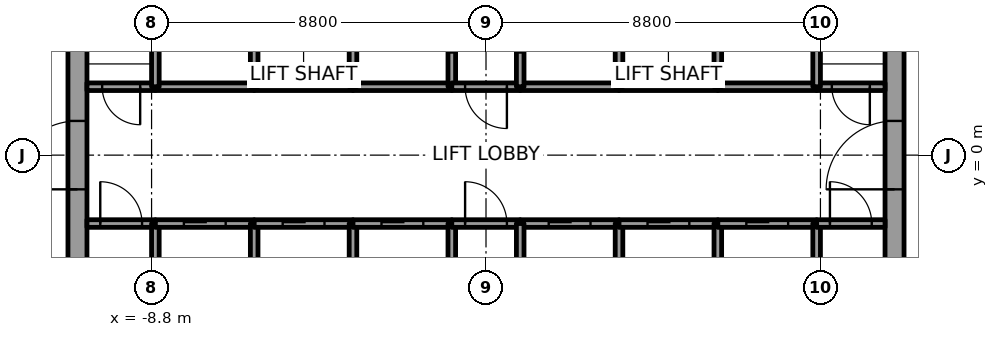
"""IFC4 building model, lengths in metres.
Left out: names, types, materials, properties, quantities, classifications, styles, units other than length and angle.
Written with IfcOpenShell. Run it as: python <this file> out.ifc"""

import sys

from ifc_helpers import new_model, si_unit, direction, frame, frame_2d, origin, place, context, subcontext, project, spatial, rectangle, extrude, element, fill, save


model = new_model("IFC4")
c1 = context("Model", 3, precision=1e-05, world=origin(), true_north=direction((0.0, 1.0)))
c2 = subcontext(c1, "Body", "Model", "MODEL_VIEW")
j1 = project(units=[si_unit("LENGTHUNIT", "METRE"), si_unit("PLANEANGLEUNIT", "RADIAN")], contexts=[c1])
p1 = place(None, origin())
s1 = spatial("IfcSite", under=j1, at=p1, CompositionType="ELEMENT")
p2 = place(p1, origin())
s2 = spatial("IfcBuilding", under=s1, at=p2, CompositionType="ELEMENT")
p3 = place(p2, frame((0.0, 0.0, 77.6)))
s3 = spatial("IfcBuildingStorey", under=s2, at=p3, CompositionType="ELEMENT", Elevation=77.6)
p4 = place(p3, frame((-10.75, -7.5, 0.0), z_axis=(0.0, 0.0, 1.0), x_axis=(0.0, 1.0, 0.0)))
e1 = element("IfcWall", 1, at=p4, inside=s3, PredefinedType="SHEAR", context=c2, shape_type="SweptSolid", body=[
    extrude(rectangle(XDim=15.0, YDim=0.5, at=frame_2d((7.5, 0.0))), origin(), (0.0, 0.0, 1.0), 3.7),
])
p5 = place(p4, frame((6.6, 0.0, 0.0)))
e2 = element("IfcOpeningElement", 2, at=p5, cuts=e1, PredefinedType="OPENING", context=c2, shape_type="SweptSolid", body=[
    extrude(rectangle(XDim=1.8, YDim=2.1, at=frame_2d((0.9, 1.05))), frame((0.0, 0.25, 0.0), z_axis=(0.0, -1.0, 0.0), x_axis=(1.0, 0.0, 0.0)), (0.0, 0.0, 1.0), 0.5),
])
p6 = place(p3, frame((10.75, -7.5, 0.0), z_axis=(0.0, 0.0, 1.0), x_axis=(0.0, 1.0, 0.0)))
e3 = element("IfcWall", 3, at=p6, inside=s3, PredefinedType="SHEAR", context=c2, shape_type="SweptSolid", body=[
    extrude(rectangle(XDim=15.0, YDim=0.5, at=frame_2d((7.5, 0.0))), origin(), (0.0, 0.0, 1.0), 3.7),
])
p7 = place(p6, frame((6.6, 0.0, 0.0)))
e4 = element("IfcOpeningElement", 4, at=p7, cuts=e3, PredefinedType="OPENING", context=c2, shape_type="SweptSolid", body=[
    extrude(rectangle(XDim=1.8, YDim=2.1, at=frame_2d((0.9, 1.05))), frame((0.0, 0.25, 0.0), z_axis=(0.0, -1.0, 0.0), x_axis=(1.0, 0.0, 0.0)), (0.0, 0.0, 1.0), 0.5),
])
p8 = place(p3, frame((-10.5, -1.8, 0.0), z_axis=(0.0, 0.0, 1.0), x_axis=(1.0, 0.0, 0.0)))
e5 = element("IfcWall", 5, at=p8, inside=s3, PredefinedType="SOLIDWALL", context=c2, shape_type="SweptSolid", body=[
    extrude(rectangle(XDim=1.8, YDim=0.2, at=frame_2d((0.9, 0.0))), origin(), (0.0, 0.0, 1.0), 3.55),
])
p9 = place(p8, frame((0.35, 0.0, 0.0)))
e6 = element("IfcOpeningElement", 6, at=p9, cuts=e5, PredefinedType="OPENING", context=c2, shape_type="SweptSolid", body=[
    extrude(rectangle(XDim=1.1, YDim=2.1, at=frame_2d((0.55, 1.05))), frame((0.0, 0.1, 0.0), z_axis=(0.0, -1.0, 0.0), x_axis=(1.0, 0.0, 0.0)), (0.0, 0.0, 1.0), 0.2),
])
p10 = place(p3, frame((-8.7, 1.8, 0.0), z_axis=(0.0, 0.0, 1.0), x_axis=(-1.0, 0.0, 0.0)))
e7 = element("IfcWall", 7, at=p10, inside=s3, PredefinedType="SOLIDWALL", context=c2, shape_type="SweptSolid", body=[
    extrude(rectangle(XDim=1.8, YDim=0.2, at=frame_2d((0.9, 0.0))), origin(), (0.0, 0.0, 1.0), 3.55),
])
p11 = place(p10, frame((0.4, 0.0, 0.0)))
e8 = element("IfcOpeningElement", 8, at=p11, cuts=e7, PredefinedType="OPENING", context=c2, shape_type="SweptSolid", body=[
    extrude(rectangle(XDim=1.0, YDim=2.1, at=frame_2d((0.5, 1.05))), frame((0.0, 0.1, 0.0), z_axis=(0.0, -1.0, 0.0), x_axis=(1.0, 0.0, 0.0)), (0.0, 0.0, 1.0), 0.2),
])
p12 = place(p3, frame((-8.7, -4.6, 0.0), z_axis=(0.0, 0.0, 1.0), x_axis=(0.0, 1.0, 0.0)))
e9 = element("IfcWall", 9, at=p12, inside=s3, PredefinedType="SOLIDWALL", context=c2, shape_type="SweptSolid", body=[
    extrude(rectangle(XDim=2.8, YDim=0.2, at=frame_2d((1.4, 0.0))), origin(), (0.0, 0.0, 1.0), 3.55),
])
p13 = place(p3, frame((-8.7, -1.8, 0.0), z_axis=(0.0, 0.0, 1.0), x_axis=(1.0, 0.0, 0.0)))
e10 = element("IfcWall", 10, at=p13, inside=s3, PredefinedType="SOLIDWALL", context=c2, shape_type="SweptSolid", body=[
    extrude(rectangle(XDim=2.6, YDim=0.2, at=frame_2d((1.3, 0.0))), origin(), (0.0, 0.0, 1.0), 3.55),
])
p14 = place(p13, frame((0.75, 0.0, 0.0)))
e11 = element("IfcOpeningElement", 11, at=p14, cuts=e10, PredefinedType="OPENING", context=c2, shape_type="SweptSolid", body=[
    extrude(rectangle(XDim=1.1, YDim=2.1, at=frame_2d((0.55, 1.05))), frame((0.0, 0.1, 0.0), z_axis=(0.0, -1.0, 0.0), x_axis=(1.0, 0.0, 0.0)), (0.0, 0.0, 1.0), 0.2),
])
p15 = place(p3, frame((-6.1, 1.8, 0.0), z_axis=(0.0, 0.0, 1.0), x_axis=(-1.0, 0.0, 0.0)))
e12 = element("IfcWall", 12, at=p15, inside=s3, PredefinedType="SOLIDWALL", context=c2, shape_type="SweptSolid", body=[
    extrude(rectangle(XDim=2.6, YDim=0.2, at=frame_2d((1.3, 0.0))), origin(), (0.0, 0.0, 1.0), 3.55),
])
for number, where, z_axis, x_axis in (
    (13, (-8.7, 1.8, 0.0), (0.0, 0.0, 1.0), (0.0, 1.0, 0.0)),
    (14, (-6.1, -4.6, 0.0), (0.0, 0.0, 1.0), (0.0, 1.0, 0.0)),
):
    element("IfcWall", number, at=place(p3, frame(where, z_axis=z_axis, x_axis=x_axis)), inside=s3, PredefinedType="SOLIDWALL", context=c2, shape_type="SweptSolid", body=[
        extrude(rectangle(XDim=2.8, YDim=0.2, at=frame_2d((1.4, 0.0))), origin(), (0.0, 0.0, 1.0), 3.55),
    ])
p16 = place(p3, frame((-6.1, -1.8, 0.0), z_axis=(0.0, 0.0, 1.0), x_axis=(1.0, 0.0, 0.0)))
e15 = element("IfcWall", 15, at=p16, inside=s3, PredefinedType="SOLIDWALL", context=c2, shape_type="SweptSolid", body=[
    extrude(rectangle(XDim=2.6, YDim=0.2, at=frame_2d((1.3, 0.0))), origin(), (0.0, 0.0, 1.0), 3.55),
])
p17 = place(p16, frame((0.75, 0.0, 0.0)))
e16 = element("IfcOpeningElement", 16, at=p17, cuts=e15, PredefinedType="OPENING", context=c2, shape_type="SweptSolid", body=[
    extrude(rectangle(XDim=1.1, YDim=2.1, at=frame_2d((0.55, 1.05))), frame((0.0, 0.1, 0.0), z_axis=(0.0, -1.0, 0.0), x_axis=(1.0, 0.0, 0.0)), (0.0, 0.0, 1.0), 0.2),
])
p18 = place(p3, frame((-3.5, 1.8, 0.0), z_axis=(0.0, 0.0, 1.0), x_axis=(-1.0, 0.0, 0.0)))
e17 = element("IfcWall", 17, at=p18, inside=s3, PredefinedType="SOLIDWALL", context=c2, shape_type="SweptSolid", body=[
    extrude(rectangle(XDim=2.6, YDim=0.2, at=frame_2d((1.3, 0.0))), origin(), (0.0, 0.0, 1.0), 3.55),
])
for number, where, z_axis, x_axis in (
    (18, (-6.1, 1.8, 0.0), (0.0, 0.0, 1.0), (0.0, 1.0, 0.0)),
    (19, (-3.5, -4.6, 0.0), (0.0, 0.0, 1.0), (0.0, 1.0, 0.0)),
):
    element("IfcWall", number, at=place(p3, frame(where, z_axis=z_axis, x_axis=x_axis)), inside=s3, PredefinedType="SOLIDWALL", context=c2, shape_type="SweptSolid", body=[
        extrude(rectangle(XDim=2.8, YDim=0.2, at=frame_2d((1.4, 0.0))), origin(), (0.0, 0.0, 1.0), 3.55),
    ])
p19 = place(p3, frame((-3.5, -1.8, 0.0), z_axis=(0.0, 0.0, 1.0), x_axis=(1.0, 0.0, 0.0)))
e20 = element("IfcWall", 20, at=p19, inside=s3, PredefinedType="SOLIDWALL", context=c2, shape_type="SweptSolid", body=[
    extrude(rectangle(XDim=2.6, YDim=0.2, at=frame_2d((1.3, 0.0))), origin(), (0.0, 0.0, 1.0), 3.55),
])
p20 = place(p19, frame((0.75, 0.0, 0.0)))
e21 = element("IfcOpeningElement", 21, at=p20, cuts=e20, PredefinedType="OPENING", context=c2, shape_type="SweptSolid", body=[
    extrude(rectangle(XDim=1.1, YDim=2.1, at=frame_2d((0.55, 1.05))), frame((0.0, 0.1, 0.0), z_axis=(0.0, -1.0, 0.0), x_axis=(1.0, 0.0, 0.0)), (0.0, 0.0, 1.0), 0.2),
])
p21 = place(p3, frame((-0.9, 1.8, 0.0), z_axis=(0.0, 0.0, 1.0), x_axis=(-1.0, 0.0, 0.0)))
e22 = element("IfcWall", 22, at=p21, inside=s3, PredefinedType="SOLIDWALL", context=c2, shape_type="SweptSolid", body=[
    extrude(rectangle(XDim=2.6, YDim=0.2, at=frame_2d((1.3, 0.0))), origin(), (0.0, 0.0, 1.0), 3.55),
])
p22 = place(p3, frame((-3.5, 4.6, 0.0), z_axis=(0.0, 0.0, 1.0), x_axis=(0.0, -1.0, 0.0)))
e23 = element("IfcWall", 23, at=p22, inside=s3, PredefinedType="SOLIDWALL", context=c2, shape_type="SweptSolid", body=[
    extrude(rectangle(XDim=2.8, YDim=0.2, at=frame_2d((1.4, 0.0))), origin(), (0.0, 0.0, 1.0), 3.55),
])
p23 = place(p3, frame((-0.9, 1.8, 0.0), z_axis=(0.0, 0.0, 1.0), x_axis=(0.0, 1.0, 0.0)))
e24 = element("IfcWall", 24, at=p23, inside=s3, PredefinedType="SOLIDWALL", context=c2, shape_type="SweptSolid", body=[
    extrude(rectangle(XDim=3.0, YDim=0.2, at=frame_2d((1.5, 0.0))), origin(), (0.0, 0.0, 1.0), 3.55),
])
p24 = place(p23, frame((0.9, 0.0, 0.0)))
e25 = element("IfcOpeningElement", 25, at=p24, cuts=e24, PredefinedType="OPENING", context=c2, shape_type="SweptSolid", body=[
    extrude(rectangle(XDim=1.2, YDim=2.1, at=frame_2d((0.6, 1.05))), frame((0.0, 0.1, 0.0), z_axis=(0.0, -1.0, 0.0), x_axis=(1.0, 0.0, 0.0)), (0.0, 0.0, 1.0), 0.2),
])
p25 = place(p3, frame((-0.9, -4.6, 0.0), z_axis=(0.0, 0.0, 1.0), x_axis=(0.0, 1.0, 0.0)))
e26 = element("IfcWall", 26, at=p25, inside=s3, PredefinedType="SOLIDWALL", context=c2, shape_type="SweptSolid", body=[
    extrude(rectangle(XDim=2.8, YDim=0.2, at=frame_2d((1.4, 0.0))), origin(), (0.0, 0.0, 1.0), 3.55),
])
p26 = place(p3, frame((-0.9, -1.8, 0.0), z_axis=(0.0, 0.0, 1.0), x_axis=(1.0, 0.0, 0.0)))
e27 = element("IfcWall", 27, at=p26, inside=s3, PredefinedType="SOLIDWALL", context=c2, shape_type="SweptSolid", body=[
    extrude(rectangle(XDim=1.8, YDim=0.2, at=frame_2d((0.9, 0.0))), origin(), (0.0, 0.0, 1.0), 3.55),
])
p27 = place(p26, frame((0.35, 0.0, 0.0)))
e28 = element("IfcOpeningElement", 28, at=p27, cuts=e27, PredefinedType="OPENING", context=c2, shape_type="SweptSolid", body=[
    extrude(rectangle(XDim=1.1, YDim=2.1, at=frame_2d((0.55, 1.05))), frame((0.0, 0.1, 0.0), z_axis=(0.0, -1.0, 0.0), x_axis=(1.0, 0.0, 0.0)), (0.0, 0.0, 1.0), 0.2),
])
p28 = place(p3, frame((0.9, 1.8, 0.0), z_axis=(0.0, 0.0, 1.0), x_axis=(-1.0, 0.0, 0.0)))
e29 = element("IfcWall", 29, at=p28, inside=s3, PredefinedType="SOLIDWALL", context=c2, shape_type="SweptSolid", body=[
    extrude(rectangle(XDim=1.8, YDim=0.2, at=frame_2d((0.9, 0.0))), origin(), (0.0, 0.0, 1.0), 3.55),
])
p29 = place(p28, frame((0.35, 0.0, 0.0)))
e30 = element("IfcOpeningElement", 30, at=p29, cuts=e29, PredefinedType="OPENING", context=c2, shape_type="SweptSolid", body=[
    extrude(rectangle(XDim=1.1, YDim=2.1, at=frame_2d((0.55, 1.05))), frame((0.0, 0.1, 0.0), z_axis=(0.0, -1.0, 0.0), x_axis=(1.0, 0.0, 0.0)), (0.0, 0.0, 1.0), 0.2),
])
p30 = place(p3, frame((0.9, -1.8, 0.0), z_axis=(0.0, 0.0, 1.0), x_axis=(1.0, 0.0, 0.0)))
e31 = element("IfcWall", 31, at=p30, inside=s3, PredefinedType="SOLIDWALL", context=c2, shape_type="SweptSolid", body=[
    extrude(rectangle(XDim=2.6, YDim=0.2, at=frame_2d((1.3, 0.0))), origin(), (0.0, 0.0, 1.0), 3.55),
])
p31 = place(p30, frame((0.75, 0.0, 0.0)))
e32 = element("IfcOpeningElement", 32, at=p31, cuts=e31, PredefinedType="OPENING", context=c2, shape_type="SweptSolid", body=[
    extrude(rectangle(XDim=1.1, YDim=2.1, at=frame_2d((0.55, 1.05))), frame((0.0, 0.1, 0.0), z_axis=(0.0, -1.0, 0.0), x_axis=(1.0, 0.0, 0.0)), (0.0, 0.0, 1.0), 0.2),
])
p32 = place(p3, frame((0.9, -1.8, 0.0), z_axis=(0.0, 0.0, 1.0), x_axis=(0.0, -1.0, 0.0)))
e33 = element("IfcWall", 33, at=p32, inside=s3, PredefinedType="SOLIDWALL", context=c2, shape_type="SweptSolid", body=[
    extrude(rectangle(XDim=2.8, YDim=0.2, at=frame_2d((1.4, 0.0))), origin(), (0.0, 0.0, 1.0), 3.55),
])
p33 = place(p3, frame((3.5, 1.8, 0.0), z_axis=(0.0, 0.0, 1.0), x_axis=(-1.0, 0.0, 0.0)))
e34 = element("IfcWall", 34, at=p33, inside=s3, PredefinedType="SOLIDWALL", context=c2, shape_type="SweptSolid", body=[
    extrude(rectangle(XDim=2.6, YDim=0.2, at=frame_2d((1.3, 0.0))), origin(), (0.0, 0.0, 1.0), 3.55),
])
p34 = place(p3, frame((0.9, 4.8, 0.0), z_axis=(0.0, 0.0, 1.0), x_axis=(0.0, -1.0, 0.0)))
e35 = element("IfcWall", 35, at=p34, inside=s3, PredefinedType="SOLIDWALL", context=c2, shape_type="SweptSolid", body=[
    extrude(rectangle(XDim=3.0, YDim=0.2, at=frame_2d((1.5, 0.0))), origin(), (0.0, 0.0, 1.0), 3.55),
])
p35 = place(p34, frame((0.9, 0.0, 0.0)))
e36 = element("IfcOpeningElement", 36, at=p35, cuts=e35, PredefinedType="OPENING", context=c2, shape_type="SweptSolid", body=[
    extrude(rectangle(XDim=1.2, YDim=2.1, at=frame_2d((0.6, 1.05))), frame((0.0, 0.1, 0.0), z_axis=(0.0, -1.0, 0.0), x_axis=(1.0, 0.0, 0.0)), (0.0, 0.0, 1.0), 0.2),
])
p36 = place(p3, frame((3.5, -4.6, 0.0), z_axis=(0.0, 0.0, 1.0), x_axis=(0.0, 1.0, 0.0)))
e37 = element("IfcWall", 37, at=p36, inside=s3, PredefinedType="SOLIDWALL", context=c2, shape_type="SweptSolid", body=[
    extrude(rectangle(XDim=2.8, YDim=0.2, at=frame_2d((1.4, 0.0))), origin(), (0.0, 0.0, 1.0), 3.55),
])
p37 = place(p3, frame((3.5, -1.8, 0.0), z_axis=(0.0, 0.0, 1.0), x_axis=(1.0, 0.0, 0.0)))
e38 = element("IfcWall", 38, at=p37, inside=s3, PredefinedType="SOLIDWALL", context=c2, shape_type="SweptSolid", body=[
    extrude(rectangle(XDim=2.6, YDim=0.2, at=frame_2d((1.3, 0.0))), origin(), (0.0, 0.0, 1.0), 3.55),
])
p38 = place(p37, frame((0.75, 0.0, 0.0)))
e39 = element("IfcOpeningElement", 39, at=p38, cuts=e38, PredefinedType="OPENING", context=c2, shape_type="SweptSolid", body=[
    extrude(rectangle(XDim=1.1, YDim=2.1, at=frame_2d((0.55, 1.05))), frame((0.0, 0.1, 0.0), z_axis=(0.0, -1.0, 0.0), x_axis=(1.0, 0.0, 0.0)), (0.0, 0.0, 1.0), 0.2),
])
p39 = place(p3, frame((6.1, 1.8, 0.0), z_axis=(0.0, 0.0, 1.0), x_axis=(-1.0, 0.0, 0.0)))
e40 = element("IfcWall", 40, at=p39, inside=s3, PredefinedType="SOLIDWALL", context=c2, shape_type="SweptSolid", body=[
    extrude(rectangle(XDim=2.6, YDim=0.2, at=frame_2d((1.3, 0.0))), origin(), (0.0, 0.0, 1.0), 3.55),
])
for number, where, z_axis, x_axis in (
    (41, (3.5, 1.8, 0.0), (0.0, 0.0, 1.0), (0.0, 1.0, 0.0)),
    (42, (6.1, -4.6, 0.0), (0.0, 0.0, 1.0), (0.0, 1.0, 0.0)),
):
    element("IfcWall", number, at=place(p3, frame(where, z_axis=z_axis, x_axis=x_axis)), inside=s3, PredefinedType="SOLIDWALL", context=c2, shape_type="SweptSolid", body=[
        extrude(rectangle(XDim=2.8, YDim=0.2, at=frame_2d((1.4, 0.0))), origin(), (0.0, 0.0, 1.0), 3.55),
    ])
p40 = place(p3, frame((6.1, -1.8, 0.0), z_axis=(0.0, 0.0, 1.0), x_axis=(1.0, 0.0, 0.0)))
e43 = element("IfcWall", 43, at=p40, inside=s3, PredefinedType="SOLIDWALL", context=c2, shape_type="SweptSolid", body=[
    extrude(rectangle(XDim=2.6, YDim=0.2, at=frame_2d((1.3, 0.0))), origin(), (0.0, 0.0, 1.0), 3.55),
])
p41 = place(p40, frame((0.75, 0.0, 0.0)))
e44 = element("IfcOpeningElement", 44, at=p41, cuts=e43, PredefinedType="OPENING", context=c2, shape_type="SweptSolid", body=[
    extrude(rectangle(XDim=1.1, YDim=2.1, at=frame_2d((0.55, 1.05))), frame((0.0, 0.1, 0.0), z_axis=(0.0, -1.0, 0.0), x_axis=(1.0, 0.0, 0.0)), (0.0, 0.0, 1.0), 0.2),
])
p42 = place(p3, frame((8.7, 1.8, 0.0), z_axis=(0.0, 0.0, 1.0), x_axis=(-1.0, 0.0, 0.0)))
e45 = element("IfcWall", 45, at=p42, inside=s3, PredefinedType="SOLIDWALL", context=c2, shape_type="SweptSolid", body=[
    extrude(rectangle(XDim=2.6, YDim=0.2, at=frame_2d((1.3, 0.0))), origin(), (0.0, 0.0, 1.0), 3.55),
])
for number, where, z_axis, x_axis in (
    (46, (6.1, 1.8, 0.0), (0.0, 0.0, 1.0), (0.0, 1.0, 0.0)),
    (47, (8.7, -1.8, 0.0), (0.0, 0.0, 1.0), (0.0, -1.0, 0.0)),
):
    element("IfcWall", number, at=place(p3, frame(where, z_axis=z_axis, x_axis=x_axis)), inside=s3, PredefinedType="SOLIDWALL", context=c2, shape_type="SweptSolid", body=[
        extrude(rectangle(XDim=2.8, YDim=0.2, at=frame_2d((1.4, 0.0))), origin(), (0.0, 0.0, 1.0), 3.55),
    ])
p43 = place(p3, frame((8.7, -1.8, 0.0), z_axis=(0.0, 0.0, 1.0), x_axis=(1.0, 0.0, 0.0)))
e48 = element("IfcWall", 48, at=p43, inside=s3, PredefinedType="SOLIDWALL", context=c2, shape_type="SweptSolid", body=[
    extrude(rectangle(XDim=1.8, YDim=0.2, at=frame_2d((0.9, 0.0))), origin(), (0.0, 0.0, 1.0), 3.55),
])
p44 = place(p43, frame((0.35, 0.0, 0.0)))
e49 = element("IfcOpeningElement", 49, at=p44, cuts=e48, PredefinedType="OPENING", context=c2, shape_type="SweptSolid", body=[
    extrude(rectangle(XDim=1.1, YDim=2.1, at=frame_2d((0.55, 1.05))), frame((0.0, 0.1, 0.0), z_axis=(0.0, -1.0, 0.0), x_axis=(1.0, 0.0, 0.0)), (0.0, 0.0, 1.0), 0.2),
])
p45 = place(p3, frame((10.5, 1.8, 0.0), z_axis=(0.0, 0.0, 1.0), x_axis=(-1.0, 0.0, 0.0)))
e50 = element("IfcWall", 50, at=p45, inside=s3, PredefinedType="SOLIDWALL", context=c2, shape_type="SweptSolid", body=[
    extrude(rectangle(XDim=1.8, YDim=0.2, at=frame_2d((0.9, 0.0))), origin(), (0.0, 0.0, 1.0), 3.55),
])
p46 = place(p45, frame((0.4, 0.0, 0.0)))
e51 = element("IfcOpeningElement", 51, at=p46, cuts=e50, PredefinedType="OPENING", context=c2, shape_type="SweptSolid", body=[
    extrude(rectangle(XDim=1.0, YDim=2.1, at=frame_2d((0.5, 1.05))), frame((0.0, 0.1, 0.0), z_axis=(0.0, -1.0, 0.0), x_axis=(1.0, 0.0, 0.0)), (0.0, 0.0, 1.0), 0.2),
])
p47 = place(p3, frame((8.7, 4.6, 0.0), z_axis=(0.0, 0.0, 1.0), x_axis=(0.0, -1.0, 0.0)))
e52 = element("IfcWall", 52, at=p47, inside=s3, PredefinedType="SOLIDWALL", context=c2, shape_type="SweptSolid", body=[
    extrude(rectangle(XDim=2.8, YDim=0.2, at=frame_2d((1.4, 0.0))), origin(), (0.0, 0.0, 1.0), 3.55),
])
p48 = place(p14, origin())
e53 = element("IfcDoor", 53, at=p48, inside=s3, OperationType="SLIDING_TO_RIGHT", PredefinedType="DOOR", context=c2, shape_type="SweptSolid", body=[
    extrude(rectangle(XDim=1.1, YDim=2.1, at=frame_2d((0.55, 1.05))), frame((0.0, 0.025, 0.0), z_axis=(0.0, -1.0, 0.0), x_axis=(1.0, 0.0, 0.0)), (0.0, 0.0, 1.0), 0.05),
])
fill(e11, e53)
p49 = place(p17, origin())
e54 = element("IfcDoor", 54, at=p49, inside=s3, OperationType="SLIDING_TO_LEFT", PredefinedType="DOOR", context=c2, shape_type="SweptSolid", body=[
    extrude(rectangle(XDim=1.1, YDim=2.1, at=frame_2d((0.55, 1.05))), frame((0.0, 0.025, 0.0), z_axis=(0.0, -1.0, 0.0), x_axis=(1.0, 0.0, 0.0)), (0.0, 0.0, 1.0), 0.05),
])
fill(e16, e54)
p50 = place(p20, origin())
e55 = element("IfcDoor", 55, at=p50, inside=s3, OperationType="SLIDING_TO_LEFT", PredefinedType="DOOR", context=c2, shape_type="SweptSolid", body=[
    extrude(rectangle(XDim=1.1, YDim=2.1, at=frame_2d((0.55, 1.05))), frame((0.0, 0.025, 0.0), z_axis=(0.0, -1.0, 0.0), x_axis=(1.0, 0.0, 0.0)), (0.0, 0.0, 1.0), 0.05),
])
fill(e21, e55)
p51 = place(p31, origin())
e56 = element("IfcDoor", 56, at=p51, inside=s3, OperationType="SLIDING_TO_LEFT", PredefinedType="DOOR", context=c2, shape_type="SweptSolid", body=[
    extrude(rectangle(XDim=1.1, YDim=2.1, at=frame_2d((0.55, 1.05))), frame((0.0, 0.025, 0.0), z_axis=(0.0, -1.0, 0.0), x_axis=(1.0, 0.0, 0.0)), (0.0, 0.0, 1.0), 0.05),
])
fill(e32, e56)
p52 = place(p38, origin())
e57 = element("IfcDoor", 57, at=p52, inside=s3, OperationType="SLIDING_TO_RIGHT", PredefinedType="DOOR", context=c2, shape_type="SweptSolid", body=[
    extrude(rectangle(XDim=1.1, YDim=2.1, at=frame_2d((0.55, 1.05))), frame((0.0, 0.025, 0.0), z_axis=(0.0, -1.0, 0.0), x_axis=(1.0, 0.0, 0.0)), (0.0, 0.0, 1.0), 0.05),
])
fill(e39, e57)
p53 = place(p41, origin())
e58 = element("IfcDoor", 58, at=p53, inside=s3, OperationType="SLIDING_TO_LEFT", PredefinedType="DOOR", context=c2, shape_type="SweptSolid", body=[
    extrude(rectangle(XDim=1.1, YDim=2.1, at=frame_2d((0.55, 1.05))), frame((0.0, 0.025, 0.0), z_axis=(0.0, -1.0, 0.0), x_axis=(1.0, 0.0, 0.0)), (0.0, 0.0, 1.0), 0.05),
])
fill(e44, e58)
p54 = place(p9, origin())
e59 = element("IfcDoor", 59, at=p54, inside=s3, OperationType="SINGLE_SWING_LEFT", PredefinedType="DOOR", context=c2, shape_type="SweptSolid", body=[
    extrude(rectangle(XDim=1.1, YDim=2.1, at=frame_2d((0.55, 1.05))), frame((0.0, 0.025, 0.0), z_axis=(0.0, -1.0, 0.0), x_axis=(1.0, 0.0, 0.0)), (0.0, 0.0, 1.0), 0.05),
])
fill(e6, e59)
p55 = place(p44, origin())
e60 = element("IfcDoor", 60, at=p55, inside=s3, OperationType="SINGLE_SWING_RIGHT", PredefinedType="DOOR", context=c2, shape_type="SweptSolid", body=[
    extrude(rectangle(XDim=1.1, YDim=2.1, at=frame_2d((0.55, 1.05))), frame((0.0, 0.025, 0.0), z_axis=(0.0, -1.0, 0.0), x_axis=(1.0, 0.0, 0.0)), (0.0, 0.0, 1.0), 0.05),
])
fill(e49, e60)
p56 = place(p29, origin())
e61 = element("IfcDoor", 61, at=p56, inside=s3, OperationType="SINGLE_SWING_LEFT", PredefinedType="DOOR", context=c2, shape_type="SweptSolid", body=[
    extrude(rectangle(XDim=1.1, YDim=2.1, at=frame_2d((0.55, 1.05))), frame((0.0, 0.025, 0.0), z_axis=(0.0, -1.0, 0.0), x_axis=(1.0, 0.0, 0.0)), (0.0, 0.0, 1.0), 0.05),
])
fill(e30, e61)
p57 = place(p27, origin())
e62 = element("IfcDoor", 62, at=p57, inside=s3, OperationType="SINGLE_SWING_LEFT", PredefinedType="DOOR", context=c2, shape_type="SweptSolid", body=[
    extrude(rectangle(XDim=1.1, YDim=2.1, at=frame_2d((0.55, 1.05))), frame((0.0, 0.025, 0.0), z_axis=(0.0, -1.0, 0.0), x_axis=(1.0, 0.0, 0.0)), (0.0, 0.0, 1.0), 0.05),
])
fill(e28, e62)
p58 = place(p11, origin())
e63 = element("IfcDoor", 63, at=p58, inside=s3, OperationType="SINGLE_SWING_RIGHT", PredefinedType="DOOR", context=c2, shape_type="SweptSolid", body=[
    extrude(rectangle(XDim=1.0, YDim=2.1, at=frame_2d((0.5, 1.05))), frame((0.0, 0.025, 0.0), z_axis=(0.0, -1.0, 0.0), x_axis=(1.0, 0.0, 0.0)), (0.0, 0.0, 1.0), 0.05),
])
fill(e8, e63)
p59 = place(p46, origin())
e64 = element("IfcDoor", 64, at=p59, inside=s3, OperationType="SINGLE_SWING_LEFT", PredefinedType="DOOR", context=c2, shape_type="SweptSolid", body=[
    extrude(rectangle(XDim=1.0, YDim=2.1, at=frame_2d((0.5, 1.05))), frame((0.0, 0.025, 0.0), z_axis=(0.0, -1.0, 0.0), x_axis=(1.0, 0.0, 0.0)), (0.0, 0.0, 1.0), 0.05),
])
fill(e51, e64)
p60 = place(p5, origin())
e65 = element("IfcDoor", 65, at=p60, inside=s3, OperationType="DOUBLE_DOOR_SINGLE_SWING", PredefinedType="DOOR", context=c2, shape_type="SweptSolid", body=[
    extrude(rectangle(XDim=1.8, YDim=2.1, at=frame_2d((0.9, 1.05))), frame((0.0, 0.025, 0.0), z_axis=(0.0, -1.0, 0.0), x_axis=(1.0, 0.0, 0.0)), (0.0, 0.0, 1.0), 0.05),
])
fill(e2, e65)
p61 = place(p7, origin())
e66 = element("IfcDoor", 66, at=p61, inside=s3, OperationType="DOUBLE_DOOR_SINGLE_SWING", PredefinedType="DOOR", context=c2, shape_type="SweptSolid", body=[
    extrude(rectangle(XDim=1.8, YDim=2.1, at=frame_2d((0.9, 1.05))), frame((0.0, 0.025, 0.0), z_axis=(0.0, -1.0, 0.0), x_axis=(1.0, 0.0, 0.0)), (0.0, 0.0, 1.0), 0.05),
])
fill(e4, e66)
save(model, sys.argv[1])
